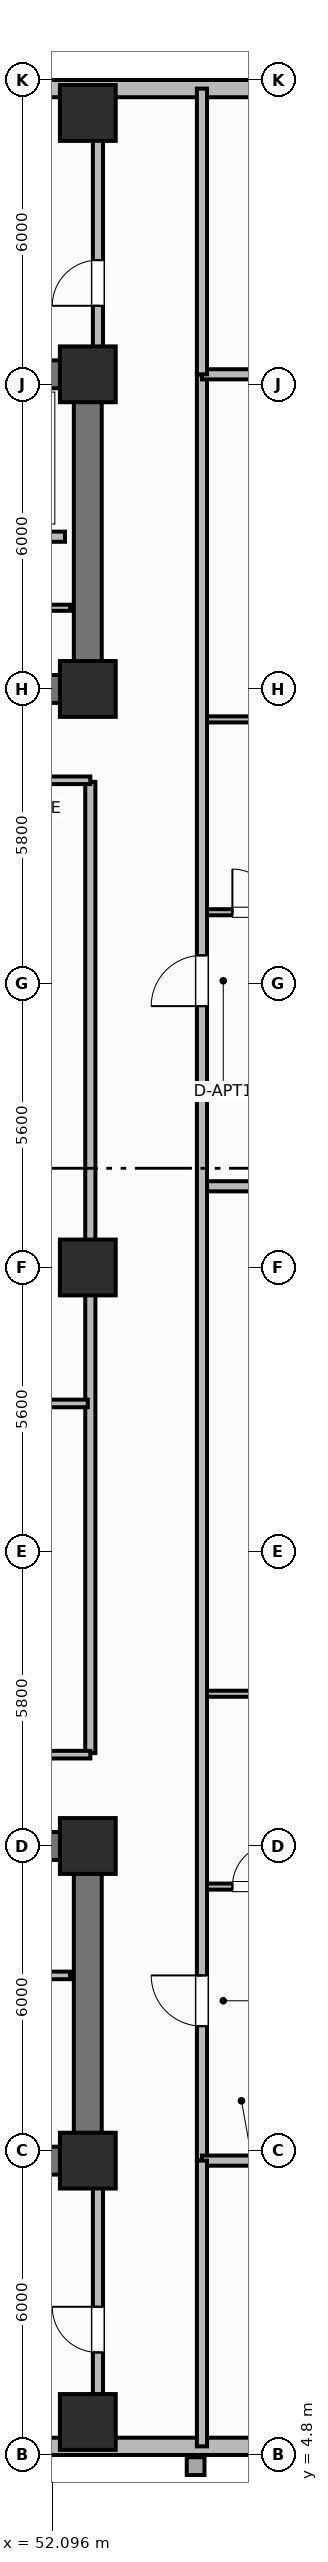
"""IFC4 building model, lengths in metres.
Left out: names, types, materials, properties, quantities, classifications, styles, units other than length and angle.
Written with IfcOpenShell. Run it as: python <this file> out.ifc"""

import sys

from ifc_helpers import new_model, si_unit, direction, frame, frame_2d, origin, origin_2d, place, context, subcontext, project, spatial, rectangle, extrude, element, fill, save


model = new_model("IFC4")
c1 = context("Model", 3, precision=1e-05, world=origin(), true_north=direction((0.0, 1.0)))
c2 = subcontext(c1, "Body", "Model", "MODEL_VIEW")
j1 = project(units=[si_unit("LENGTHUNIT", "METRE"), si_unit("PLANEANGLEUNIT", "RADIAN")], contexts=[c1])
p1 = place(None, origin())
s1 = spatial("IfcSite", under=j1, at=p1, CompositionType="ELEMENT")
p2 = place(p1, origin())
s2 = spatial("IfcBuilding", under=s1, at=p2, CompositionType="ELEMENT")
p3 = place(p2, frame((0.0, 0.0, 84.1)))
s3 = spatial("IfcBuildingStorey", under=s2, at=p3, CompositionType="ELEMENT", Elevation=84.1)
p4 = place(p3, frame((52.8, 10.6, 0.0), z_axis=(0.0, 0.0, 1.0), x_axis=(-1.0, 0.0, 0.0)))
e1 = element("IfcWall", 1, at=p4, inside=s3, PredefinedType="SHEAR", context=c2, shape_type="SweptSolid", body=[
    extrude(rectangle(XDim=27.2, YDim=0.55, at=frame_2d((13.6, 0.0))), origin(), (0.0, 0.0, 1.0), 4.2),
])
p5 = place(p3, frame((52.8, 10.875, 0.0), z_axis=(0.0, 0.0, 1.0), x_axis=(0.0, 1.0, 0.0)))
e2 = element("IfcWall", 2, at=p5, inside=s3, PredefinedType="SHEAR", context=c2, shape_type="SweptSolid", body=[
    extrude(rectangle(XDim=5.65, YDim=0.55, at=frame_2d((2.825, 0.0))), origin(), (0.0, 0.0, 1.0), 4.2),
])
p6 = place(p3, frame((25.6, 16.8, 0.0), z_axis=(0.0, 0.0, 1.0), x_axis=(1.0, 0.0, 0.0)))
e3 = element("IfcWall", 3, at=p6, inside=s3, PredefinedType="SHEAR", context=c2, shape_type="SweptSolid", body=[
    extrude(rectangle(XDim=27.2, YDim=0.55, at=frame_2d((13.6, 0.0))), origin(), (0.0, 0.0, 1.0), 4.2),
])
p7 = place(p6, frame((1.8, 0.0, 0.0)))
e4 = element("IfcOpeningElement", 4, at=p7, cuts=e3, PredefinedType="OPENING", context=c2, shape_type="SweptSolid", body=[
    extrude(rectangle(XDim=1.1, YDim=2.15, at=frame_2d((0.55, 1.075))), frame((0.0, 0.285, 0.0), z_axis=(0.0, -1.0, 0.0), x_axis=(1.0, 0.0, 0.0)), (0.0, 0.0, 1.0), 0.57),
])
p8 = place(p6, frame((5.6, 0.0, 0.0)))
e5 = element("IfcOpeningElement", 5, at=p8, cuts=e3, PredefinedType="OPENING", context=c2, shape_type="SweptSolid", body=[
    extrude(rectangle(XDim=0.85, YDim=2.1, at=frame_2d((0.425, 1.05))), frame((0.0, 0.285, 0.0), z_axis=(0.0, -1.0, 0.0), x_axis=(1.0, 0.0, 0.0)), (0.0, 0.0, 1.0), 0.57),
])
p9 = place(p6, frame((13.0, 0.0, 0.0)))
e6 = element("IfcOpeningElement", 6, at=p9, cuts=e3, PredefinedType="OPENING", context=c2, shape_type="SweptSolid", body=[
    extrude(rectangle(XDim=1.2, YDim=2.15, at=frame_2d((0.6, 1.075))), frame((0.0, 0.285, 0.0), z_axis=(0.0, -1.0, 0.0), x_axis=(1.0, 0.0, 0.0)), (0.0, 0.0, 1.0), 0.57),
])
p10 = place(p6, frame((20.4, 0.0, 0.0)))
e7 = element("IfcOpeningElement", 7, at=p10, cuts=e3, PredefinedType="OPENING", context=c2, shape_type="SweptSolid", body=[
    extrude(rectangle(XDim=1.3, YDim=2.2, at=frame_2d((0.65, 1.1))), frame((0.0, 0.285, 0.0), z_axis=(0.0, -1.0, 0.0), x_axis=(1.0, 0.0, 0.0)), (0.0, 0.0, 1.0), 0.57),
])
p11 = place(p6, frame((24.65, 0.0, 0.0)))
e8 = element("IfcOpeningElement", 8, at=p11, cuts=e3, PredefinedType="OPENING", context=c2, shape_type="SweptSolid", body=[
    extrude(rectangle(XDim=0.85, YDim=2.1, at=frame_2d((0.425, 1.05))), frame((0.0, 0.285, 0.0), z_axis=(0.0, -1.0, 0.0), x_axis=(1.0, 0.0, 0.0)), (0.0, 0.0, 1.0), 0.57),
])
p12 = place(p3, frame((25.6, 45.8, 0.0), z_axis=(0.0, 0.0, 1.0), x_axis=(1.0, 0.0, 0.0)))
e9 = element("IfcWall", 9, at=p12, inside=s3, PredefinedType="SHEAR", context=c2, shape_type="SweptSolid", body=[
    extrude(rectangle(XDim=27.2, YDim=0.55, at=frame_2d((13.6, 0.0))), origin(), (0.0, 0.0, 1.0), 4.2),
])
p13 = place(p3, frame((52.8, 39.875, 0.0), z_axis=(0.0, 0.0, 1.0), x_axis=(0.0, 1.0, 0.0)))
e10 = element("IfcWall", 10, at=p13, inside=s3, PredefinedType="SHEAR", context=c2, shape_type="SweptSolid", body=[
    extrude(rectangle(XDim=5.65, YDim=0.55, at=frame_2d((2.825, 0.0))), origin(), (0.0, 0.0, 1.0), 4.2),
])
p14 = place(p3, frame((52.8, 39.6, 0.0), z_axis=(0.0, 0.0, 1.0), x_axis=(-1.0, 0.0, 0.0)))
e11 = element("IfcWall", 11, at=p14, inside=s3, PredefinedType="SHEAR", context=c2, shape_type="SweptSolid", body=[
    extrude(rectangle(XDim=27.2, YDim=0.55, at=frame_2d((13.6, 0.0))), origin(), (0.0, 0.0, 1.0), 4.2),
])
p15 = place(p14, frame((24.2, 0.0, 0.0)))
e12 = element("IfcOpeningElement", 12, at=p15, cuts=e11, PredefinedType="OPENING", context=c2, shape_type="SweptSolid", body=[
    extrude(rectangle(XDim=1.1, YDim=2.15, at=frame_2d((0.55, 1.075))), frame((0.0, 0.285, 0.0), z_axis=(0.0, -1.0, 0.0), x_axis=(1.0, 0.0, 0.0)), (0.0, 0.0, 1.0), 0.57),
])
p16 = place(p14, frame((20.55, 0.0, 0.0)))
e13 = element("IfcOpeningElement", 13, at=p16, cuts=e11, PredefinedType="OPENING", context=c2, shape_type="SweptSolid", body=[
    extrude(rectangle(XDim=0.95, YDim=2.1, at=frame_2d((0.475, 1.05))), frame((0.0, 0.285, 0.0), z_axis=(0.0, -1.0, 0.0), x_axis=(1.0, 0.0, 0.0)), (0.0, 0.0, 1.0), 0.57),
])
p17 = place(p14, frame((15.1, 0.0, 0.0)))
e14 = element("IfcOpeningElement", 14, at=p17, cuts=e11, PredefinedType="OPENING", context=c2, shape_type="SweptSolid", body=[
    extrude(rectangle(XDim=1.2, YDim=2.15, at=frame_2d((0.6, 1.075))), frame((0.0, 0.285, 0.0), z_axis=(0.0, -1.0, 0.0), x_axis=(1.0, 0.0, 0.0)), (0.0, 0.0, 1.0), 0.57),
])
p18 = place(p14, frame((11.3, 0.0, 0.0)))
e15 = element("IfcOpeningElement", 15, at=p18, cuts=e11, PredefinedType="OPENING", context=c2, shape_type="SweptSolid", body=[
    extrude(rectangle(XDim=1.3, YDim=2.2, at=frame_2d((0.65, 1.1))), frame((0.0, 0.285, 0.0), z_axis=(0.0, -1.0, 0.0), x_axis=(1.0, 0.0, 0.0)), (0.0, 0.0, 1.0), 0.57),
])
p19 = place(p14, frame((7.25, 0.0, 0.0)))
e16 = element("IfcOpeningElement", 16, at=p19, cuts=e11, PredefinedType="OPENING", context=c2, shape_type="SweptSolid", body=[
    extrude(rectangle(XDim=0.85, YDim=2.1, at=frame_2d((0.425, 1.05))), frame((0.0, 0.285, 0.0), z_axis=(0.0, -1.0, 0.0), x_axis=(1.0, 0.0, 0.0)), (0.0, 0.0, 1.0), 0.57),
])
p20 = place(p14, frame((3.0, 0.0, 0.0)))
e17 = element("IfcOpeningElement", 17, at=p20, cuts=e11, PredefinedType="OPENING", context=c2, shape_type="SweptSolid", body=[
    extrude(rectangle(XDim=0.9, YDim=2.1, at=frame_2d((0.45, 1.05))), frame((0.0, 0.285, 0.0), z_axis=(0.0, -1.0, 0.0), x_axis=(1.0, 0.0, 0.0)), (0.0, 0.0, 1.0), 0.57),
])
for number, where, z_axis, x_axis in (
    (18, (52.8, 10.6, 0.0), (0.0, 0.0, 1.0), (1.0, 0.0, 0.0)),
    (19, (52.8, 16.8, 0.0), (0.0, 0.0, 1.0), (1.0, 0.0, 0.0)),
    (20, (52.8, 39.6, 0.0), (0.0, 0.0, 1.0), (1.0, 0.0, 0.0)),
    (21, (52.8, 45.8, 0.0), (0.0, 0.0, 1.0), (1.0, 0.0, 0.0)),
    (22, (52.8, 28.2, 0.0), (0.0, 0.0, 1.0), (1.0, 0.0, 0.0)),
    (23, (52.8, 5.45, 0.0), (0.0, 0.0, 1.0), (1.0, 0.0, 0.0)),
    (24, (52.8, 50.95, 0.0), (0.0, 0.0, 1.0), (1.0, 0.0, 0.0)),
):
    element("IfcColumn", number, at=place(p3, frame(where, z_axis=z_axis, x_axis=x_axis)), inside=s3, PredefinedType="COLUMN", context=c2, shape_type="SweptSolid", body=[
        extrude(rectangle(XDim=1.1, YDim=1.1, at=origin_2d()), origin(), (0.0, 0.0, 1.0), 4.2),
    ])
p21 = place(p3, frame((50.05, 4.97, 0.0), z_axis=(0.0, 0.0, 1.0), x_axis=(1.0, 0.0, 0.0)))
e25 = element("IfcWall", 25, at=p21, inside=s3, PredefinedType="SOLIDWALL", context=c2, shape_type="SweptSolid", body=[
    extrude(rectangle(XDim=9.75, YDim=0.34, at=frame_2d((4.875, 0.0))), origin(), (0.0, 0.0, 1.0), 3.2),
])
p22 = place(p21, frame((6.087, 0.0, 0.85)))
e26 = element("IfcOpeningElement", 26, at=p22, cuts=e25, PredefinedType="OPENING", context=c2, shape_type="SweptSolid", body=[
    extrude(rectangle(XDim=1.8, YDim=1.85, at=frame_2d((0.9, 0.925))), frame((0.0, 0.18, 0.0), z_axis=(0.0, -1.0, 0.0), x_axis=(1.0, 0.0, 0.0)), (0.0, 0.0, 1.0), 0.36),
])
p23 = place(p3, frame((59.8, 51.43, 0.0), z_axis=(0.0, 0.0, 1.0), x_axis=(-1.0, 0.0, 0.0)))
e27 = element("IfcWall", 27, at=p23, inside=s3, PredefinedType="SOLIDWALL", context=c2, shape_type="SweptSolid", body=[
    extrude(rectangle(XDim=8.45, YDim=0.34, at=frame_2d((4.225, 0.0))), origin(), (0.0, 0.0, 1.0), 3.2),
])
p24 = place(p23, frame((1.887, 0.0, 0.95)))
e28 = element("IfcOpeningElement", 28, at=p24, cuts=e27, PredefinedType="OPENING", context=c2, shape_type="SweptSolid", body=[
    extrude(rectangle(XDim=1.1, YDim=1.65, at=frame_2d((0.55, 0.825))), frame((0.0, 0.18, 0.0), z_axis=(0.0, -1.0, 0.0), x_axis=(1.0, 0.0, 0.0)), (0.0, 0.0, 1.0), 0.36),
])
p25 = place(p3, frame((49.6, 14.25, 0.0), z_axis=(0.0, 0.0, 1.0), x_axis=(1.0, 0.0, 0.0)))
e29 = element("IfcWall", 29, at=p25, inside=s3, PredefinedType="PARTITIONING", context=c2, shape_type="SweptSolid", body=[
    extrude(rectangle(XDim=2.85, YDim=0.15, at=frame_2d((1.425, 0.0))), origin(), (0.0, 0.0, 1.0), 3.03),
])
p26 = place(p25, frame((0.9, 0.0, 0.0)))
e30 = element("IfcOpeningElement", 30, at=p26, cuts=e29, PredefinedType="OPENING", context=c2, shape_type="SweptSolid", body=[
    extrude(rectangle(XDim=0.85, YDim=2.1, at=frame_2d((0.425, 1.05))), frame((0.0, 0.085, 0.0), z_axis=(0.0, -1.0, 0.0), x_axis=(1.0, 0.0, 0.0)), (0.0, 0.0, 1.0), 0.17),
])
p27 = place(p3, frame((52.35, 42.6, 0.0), z_axis=(0.0, 0.0, 1.0), x_axis=(-1.0, 0.0, 0.0)))
e31 = element("IfcWall", 31, at=p27, inside=s3, PredefinedType="PARTITIONING", context=c2, shape_type="SweptSolid", body=[
    extrude(rectangle(XDim=8.8, YDim=0.2, at=frame_2d((4.4, 0.0))), origin(), (0.0, 0.0, 1.0), 3.03),
])
p28 = place(p27, frame((7.1, 0.0, 0.0)))
e32 = element("IfcOpeningElement", 32, at=p28, cuts=e31, PredefinedType="OPENING", context=c2, shape_type="SweptSolid", body=[
    extrude(rectangle(XDim=1.0, YDim=2.15, at=frame_2d((0.5, 1.075))), frame((0.0, 0.11, 0.0), z_axis=(0.0, -1.0, 0.0), x_axis=(1.0, 0.0, 0.0)), (0.0, 0.0, 1.0), 0.22),
])
p29 = place(p3, frame((46.2, 41.2, 0.0), z_axis=(0.0, 0.0, 1.0), x_axis=(1.0, 0.0, 0.0)))
e33 = element("IfcWall", 33, at=p29, inside=s3, PredefinedType="PARTITIONING", context=c2, shape_type="SweptSolid", body=[
    extrude(rectangle(XDim=6.25, YDim=0.12, at=frame_2d((3.125, 0.0))), origin(), (0.0, 0.0, 1.0), 3.03),
])
p30 = place(p29, frame((1.8, 0.0, 0.0)))
e34 = element("IfcOpeningElement", 34, at=p30, cuts=e33, PredefinedType="OPENING", context=c2, shape_type="SweptSolid", body=[
    extrude(rectangle(XDim=0.85, YDim=2.1, at=frame_2d((0.425, 1.05))), frame((0.0, 0.07, 0.0), z_axis=(0.0, -1.0, 0.0), x_axis=(1.0, 0.0, 0.0)), (0.0, 0.0, 1.0), 0.14),
])
p31 = place(p3, frame((52.85, 18.63, 0.0), z_axis=(0.0, 0.0, 1.0), x_axis=(0.0, 1.0, 0.0)))
e35 = element("IfcWall", 35, at=p31, inside=s3, PredefinedType="PARTITIONING", context=c2, shape_type="SweptSolid", body=[
    extrude(rectangle(XDim=19.14, YDim=0.2, at=frame_2d((9.57, 0.0))), origin(), (0.0, 0.0, 1.0), 3.03),
])
for number, where, z_axis, x_axis in (
    (36, (40.35, 18.6, 0.0), (0.0, 0.0, 1.0), (1.0, 0.0, 0.0)),
    (37, (40.35, 37.8, 0.0), (0.0, 0.0, 1.0), (1.0, 0.0, 0.0)),
):
    element("IfcWall", number, at=place(p3, frame(where, z_axis=z_axis, x_axis=x_axis)), inside=s3, PredefinedType="PARTITIONING", context=c2, shape_type="SweptSolid", body=[
        extrude(rectangle(XDim=12.5, YDim=0.15, at=frame_2d((6.25, 0.0))), origin(), (0.0, 0.0, 1.0), 3.03),
    ])
p32 = place(p3, frame((40.38, 25.521, 0.0), z_axis=(0.0, 0.0, 1.0), x_axis=(1.0, 0.0, 0.0)))
e38 = element("IfcWall", 38, at=p32, inside=s3, PredefinedType="PARTITIONING", context=c2, shape_type="SweptSolid", body=[
    extrude(rectangle(XDim=12.42, YDim=0.15, at=frame_2d((6.21, 0.0))), origin(), (0.0, 0.0, 1.0), 3.03),
])
p33 = place(p3, frame((55.05, 16.0, 0.0), z_axis=(0.0, 0.0, 1.0), x_axis=(1.0, 0.0, 0.0)))
e39 = element("IfcWall", 39, at=p33, inside=s3, PredefinedType="PARTITIONING", context=c2, shape_type="SweptSolid", body=[
    extrude(rectangle(XDim=2.25, YDim=0.12, at=frame_2d((1.125, 0.0))), origin(), (0.0, 0.0, 1.0), 3.03),
])
p34 = place(p33, frame((0.6, 0.0, 0.0)))
e40 = element("IfcOpeningElement", 40, at=p34, cuts=e39, PredefinedType="OPENING", context=c2, shape_type="SweptSolid", body=[
    extrude(rectangle(XDim=0.85, YDim=2.1, at=frame_2d((0.425, 1.05))), frame((0.0, 0.07, 0.0), z_axis=(0.0, -1.0, 0.0), x_axis=(1.0, 0.0, 0.0)), (0.0, 0.0, 1.0), 0.14),
])
p35 = place(p3, frame((55.05, 19.8, 0.0), z_axis=(0.0, 0.0, 1.0), x_axis=(1.0, 0.0, 0.0)))
e41 = element("IfcWall", 41, at=p35, inside=s3, PredefinedType="PARTITIONING", context=c2, shape_type="SweptSolid", body=[
    extrude(rectangle(XDim=2.25, YDim=0.12, at=frame_2d((1.125, 0.0))), origin(), (0.0, 0.0, 1.0), 3.03),
])
p36 = place(p3, frame((55.05, 29.8, 0.0), z_axis=(0.0, 0.0, 1.0), x_axis=(1.0, 0.0, 0.0)))
e42 = element("IfcWall", 42, at=p36, inside=s3, PredefinedType="PARTITIONING", context=c2, shape_type="SweptSolid", body=[
    extrude(rectangle(XDim=8.494, YDim=0.2, at=frame_2d((4.247, 0.0))), origin(), (0.0, 0.0, 1.0), 3.03),
])
p37 = place(p3, frame((55.05, 35.2, 0.0), z_axis=(0.0, 0.0, 1.0), x_axis=(1.0, 0.0, 0.0)))
e43 = element("IfcWall", 43, at=p37, inside=s3, PredefinedType="PARTITIONING", context=c2, shape_type="SweptSolid", body=[
    extrude(rectangle(XDim=2.25, YDim=0.12, at=frame_2d((1.125, 0.0))), origin(), (0.0, 0.0, 1.0), 3.03),
])
p38 = place(p37, frame((0.6, 0.0, 0.0)))
e44 = element("IfcOpeningElement", 44, at=p38, cuts=e43, PredefinedType="OPENING", context=c2, shape_type="SweptSolid", body=[
    extrude(rectangle(XDim=0.85, YDim=2.1, at=frame_2d((0.425, 1.05))), frame((0.0, 0.07, 0.0), z_axis=(0.0, -1.0, 0.0), x_axis=(1.0, 0.0, 0.0)), (0.0, 0.0, 1.0), 0.14),
])
p39 = place(p3, frame((55.05, 39.0, 0.0), z_axis=(0.0, 0.0, 1.0), x_axis=(1.0, 0.0, 0.0)))
e45 = element("IfcWall", 45, at=p39, inside=s3, PredefinedType="PARTITIONING", context=c2, shape_type="SweptSolid", body=[
    extrude(rectangle(XDim=2.25, YDim=0.12, at=frame_2d((1.125, 0.0))), origin(), (0.0, 0.0, 1.0), 3.03),
])
p40 = place(p3, frame((55.05, 10.6, 0.0), z_axis=(0.0, 0.0, 1.0), x_axis=(0.0, 1.0, 0.0)))
e46 = element("IfcWall", 46, at=p40, inside=s3, PredefinedType="PARTITIONING", context=c2, shape_type="SweptSolid", body=[
    extrude(rectangle(XDim=35.2, YDim=0.2, at=frame_2d((17.6, 0.0))), origin(), (0.0, 0.0, 1.0), 3.03),
])
p41 = place(p40, frame((2.65, 0.0, 0.0)))
e47 = element("IfcOpeningElement", 47, at=p41, cuts=e46, PredefinedType="OPENING", context=c2, shape_type="SweptSolid", body=[
    extrude(rectangle(XDim=1.0, YDim=2.15, at=frame_2d((0.5, 1.075))), frame((0.0, 0.11, 0.0), z_axis=(0.0, -1.0, 0.0), x_axis=(1.0, 0.0, 0.0)), (0.0, 0.0, 1.0), 0.22),
])
p42 = place(p40, frame((22.75, 0.0, 0.0)))
e48 = element("IfcOpeningElement", 48, at=p42, cuts=e46, PredefinedType="OPENING", context=c2, shape_type="SweptSolid", body=[
    extrude(rectangle(XDim=1.0, YDim=2.15, at=frame_2d((0.5, 1.075))), frame((0.0, 0.11, 0.0), z_axis=(0.0, -1.0, 0.0), x_axis=(1.0, 0.0, 0.0)), (0.0, 0.0, 1.0), 0.22),
])
for number, where, z_axis, x_axis in (
    (49, (55.05, 10.6, 0.0), (0.0, 0.0, 1.0), (1.0, 0.0, 0.0)),
    (50, (55.05, 45.8, 0.0), (0.0, 0.0, 1.0), (1.0, 0.0, 0.0)),
):
    element("IfcWall", number, at=place(p3, frame(where, z_axis=z_axis, x_axis=x_axis)), inside=s3, PredefinedType="PARTITIONING", context=c2, shape_type="SweptSolid", body=[
        extrude(rectangle(XDim=8.36, YDim=0.2, at=frame_2d((4.18, 0.0))), origin(), (0.0, 0.0, 1.0), 3.03),
    ])
p43 = place(p3, frame((55.05, 4.97, 0.0), z_axis=(0.0, 0.0, 1.0), x_axis=(0.0, 1.0, 0.0)))
e51 = element("IfcWall", 51, at=p43, inside=s3, PredefinedType="PARTITIONING", context=c2, shape_type="SweptSolid", body=[
    extrude(rectangle(XDim=5.63, YDim=0.2, at=frame_2d((2.815, 0.0))), origin(), (0.0, 0.0, 1.0), 3.03),
])
p44 = place(p3, frame((55.05, 45.8, 0.0), z_axis=(0.0, 0.0, 1.0), x_axis=(0.0, 1.0, 0.0)))
e52 = element("IfcWall", 52, at=p44, inside=s3, PredefinedType="PARTITIONING", context=c2, shape_type="SweptSolid", body=[
    extrude(rectangle(XDim=5.63, YDim=0.2, at=frame_2d((2.815, 0.0))), origin(), (0.0, 0.0, 1.0), 3.03),
])
p45 = place(p3, frame((53.0, 5.52, 0.0), z_axis=(0.0, 0.0, 1.0), x_axis=(0.0, 1.0, 0.0)))
e53 = element("IfcWall", 53, at=p45, inside=s3, PredefinedType="PARTITIONING", context=c2, shape_type="SweptSolid", body=[
    extrude(rectangle(XDim=4.78, YDim=0.2, at=frame_2d((2.39, 0.0))), origin(), (0.0, 0.0, 1.0), 3.03),
])
p46 = place(p45, frame((1.3, 0.0, 0.0)))
e54 = element("IfcOpeningElement", 54, at=p46, cuts=e53, PredefinedType="OPENING", context=c2, shape_type="SweptSolid", body=[
    extrude(rectangle(XDim=0.9, YDim=2.1, at=frame_2d((0.45, 1.05))), frame((0.0, 0.11, 0.0), z_axis=(0.0, -1.0, 0.0), x_axis=(1.0, 0.0, 0.0)), (0.0, 0.0, 1.0), 0.22),
])
p47 = place(p3, frame((53.0, 46.1, 0.0), z_axis=(0.0, 0.0, 1.0), x_axis=(0.0, 1.0, 0.0)))
e55 = element("IfcWall", 55, at=p47, inside=s3, PredefinedType="PARTITIONING", context=c2, shape_type="SweptSolid", body=[
    extrude(rectangle(XDim=4.78, YDim=0.2, at=frame_2d((2.39, 0.0))), origin(), (0.0, 0.0, 1.0), 3.03),
])
p48 = place(p47, frame((1.05, 0.0, 0.0)))
e56 = element("IfcOpeningElement", 56, at=p48, cuts=e55, PredefinedType="OPENING", context=c2, shape_type="SweptSolid", body=[
    extrude(rectangle(XDim=0.9, YDim=2.1, at=frame_2d((0.45, 1.05))), frame((0.0, 0.11, 0.0), z_axis=(0.0, -1.0, 0.0), x_axis=(1.0, 0.0, 0.0)), (0.0, 0.0, 1.0), 0.22),
])
p49 = place(p34, origin())
e57 = element("IfcDoor", 57, at=p49, inside=s3, OperationType="SINGLE_SWING_RIGHT", PredefinedType="DOOR", context=c2, shape_type="SweptSolid", body=[
    extrude(rectangle(XDim=0.85, YDim=2.1, at=frame_2d((0.425, 1.05))), frame((0.0, 0.025, 0.0), z_axis=(0.0, -1.0, 0.0), x_axis=(1.0, 0.0, 0.0)), (0.0, 0.0, 1.0), 0.05),
])
fill(e40, e57)
p50 = place(p38, origin())
e58 = element("IfcDoor", 58, at=p50, inside=s3, OperationType="SINGLE_SWING_LEFT", PredefinedType="DOOR", context=c2, shape_type="SweptSolid", body=[
    extrude(rectangle(XDim=0.85, YDim=2.1, at=frame_2d((0.425, 1.05))), frame((0.0, 0.025, 0.0), z_axis=(0.0, -1.0, 0.0), x_axis=(1.0, 0.0, 0.0)), (0.0, 0.0, 1.0), 0.05),
])
fill(e44, e58)
p51 = place(p41, origin())
e59 = element("IfcDoor", 59, at=p51, inside=s3, OperationType="SINGLE_SWING_RIGHT", PredefinedType="DOOR", context=c2, shape_type="SweptSolid", body=[
    extrude(rectangle(XDim=1.0, YDim=2.15, at=frame_2d((0.5, 1.075))), frame((0.0, 0.025, 0.0), z_axis=(0.0, -1.0, 0.0), x_axis=(1.0, 0.0, 0.0)), (0.0, 0.0, 1.0), 0.05),
])
fill(e47, e59)
p52 = place(p42, origin())
e60 = element("IfcDoor", 60, at=p52, inside=s3, OperationType="SINGLE_SWING_LEFT", PredefinedType="DOOR", context=c2, shape_type="SweptSolid", body=[
    extrude(rectangle(XDim=1.0, YDim=2.15, at=frame_2d((0.5, 1.075))), frame((0.0, 0.025, 0.0), z_axis=(0.0, -1.0, 0.0), x_axis=(1.0, 0.0, 0.0)), (0.0, 0.0, 1.0), 0.05),
])
fill(e48, e60)
p53 = place(p46, origin())
e61 = element("IfcDoor", 61, at=p53, inside=s3, OperationType="SINGLE_SWING_RIGHT", PredefinedType="DOOR", context=c2, shape_type="SweptSolid", body=[
    extrude(rectangle(XDim=0.9, YDim=2.1, at=frame_2d((0.45, 1.05))), frame((0.0, 0.025, 0.0), z_axis=(0.0, -1.0, 0.0), x_axis=(1.0, 0.0, 0.0)), (0.0, 0.0, 1.0), 0.05),
])
fill(e54, e61)
p54 = place(p48, origin())
e62 = element("IfcDoor", 62, at=p54, inside=s3, OperationType="SINGLE_SWING_LEFT", PredefinedType="DOOR", context=c2, shape_type="SweptSolid", body=[
    extrude(rectangle(XDim=0.9, YDim=2.1, at=frame_2d((0.45, 1.05))), frame((0.0, 0.025, 0.0), z_axis=(0.0, -1.0, 0.0), x_axis=(1.0, 0.0, 0.0)), (0.0, 0.0, 1.0), 0.05),
])
fill(e56, e62)
save(model, sys.argv[1])
